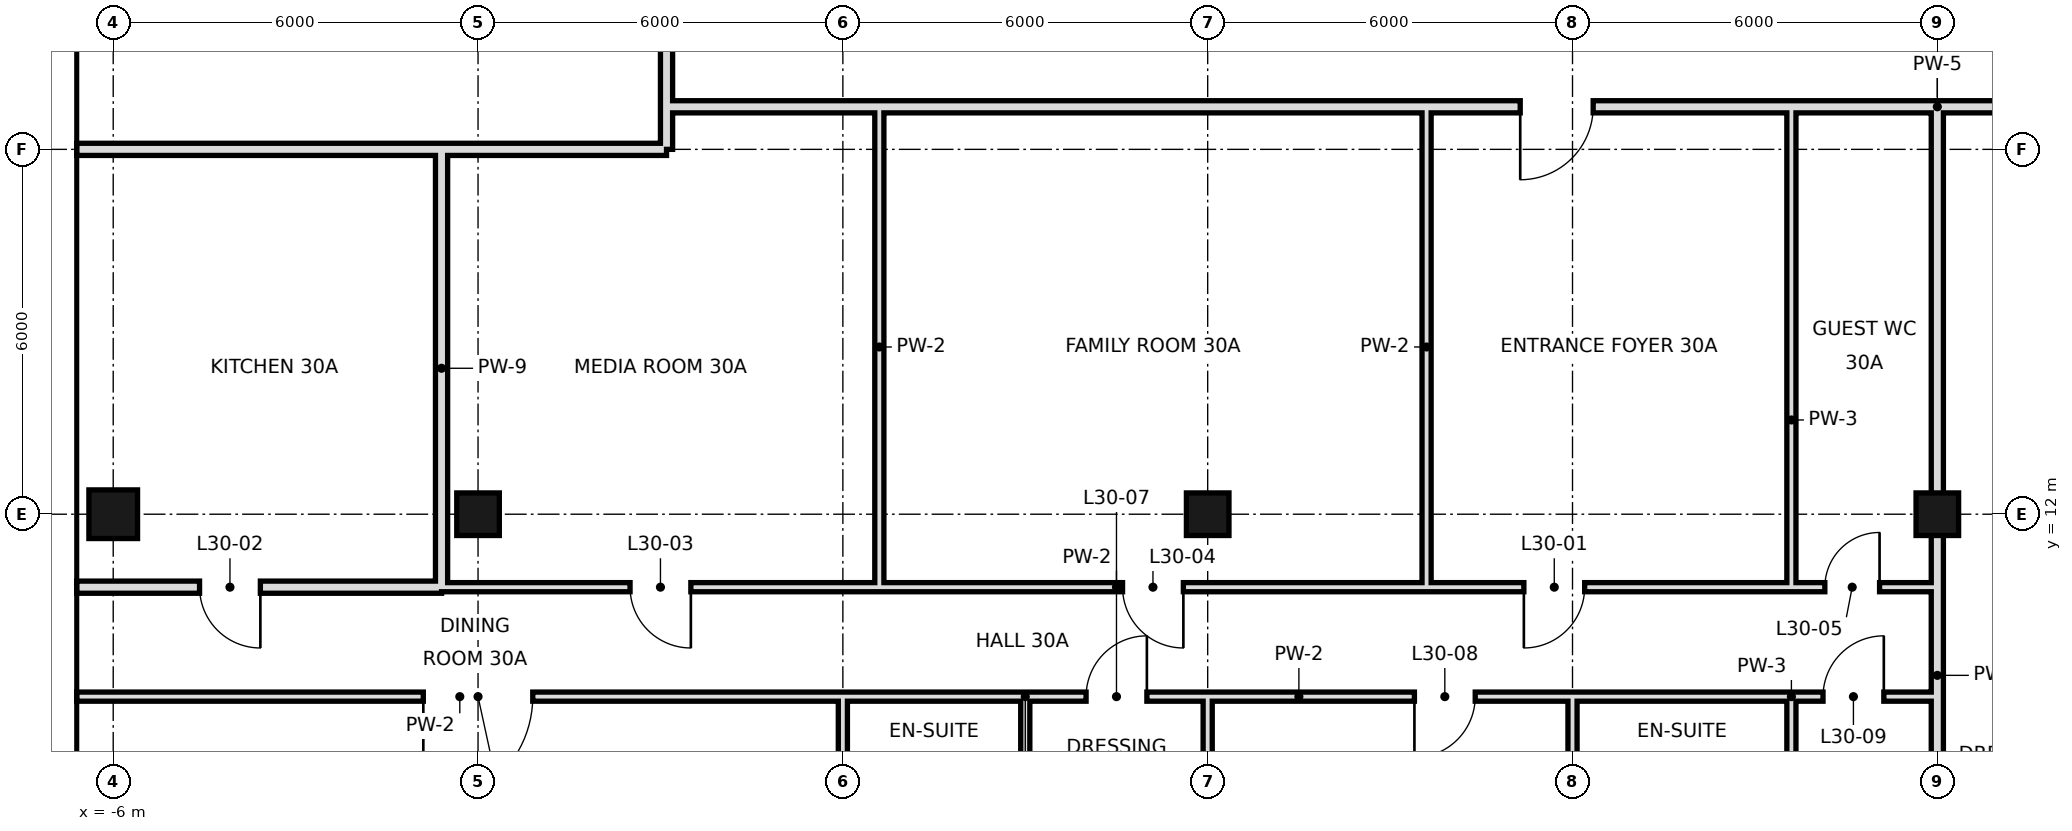
"""IFC4 building model, lengths in metres.
Left out: names, types, materials, properties, quantities, classifications, styles, units other than length and angle.
Written with IfcOpenShell. Run it as: python <this file> out.ifc"""

import sys

from ifc_helpers import new_model, si_unit, direction, frame, frame_2d, origin, origin_2d, place, context, subcontext, project, spatial, rectangle, hollow_rectangle, extrude, element, fill, save


model = new_model("IFC4")
c1 = context("Model", 3, precision=1e-05, world=origin(), true_north=direction((0.0, 1.0)))
c2 = subcontext(c1, "Body", "Model", "MODEL_VIEW")
j1 = project(units=[si_unit("LENGTHUNIT", "METRE"), si_unit("PLANEANGLEUNIT", "RADIAN")], contexts=[c1])
p1 = place(None, origin())
s1 = spatial("IfcSite", under=j1, at=p1, CompositionType="ELEMENT")
p2 = place(p1, origin())
s2 = spatial("IfcBuilding", under=s1, at=p2, CompositionType="ELEMENT")
p3 = place(p2, frame((0.0, 0.0, 134.0)))
s3 = spatial("IfcBuildingStorey", under=s2, at=p3, CompositionType="ELEMENT", Elevation=134.0)
p4 = place(p3, frame((-6.0, 12.0, 0.0), z_axis=(0.0, 0.0, 1.0), x_axis=(1.0, 0.0, 0.0)))
e1 = element("IfcColumn", 1, at=p4, inside=s3, PredefinedType="COLUMN", context=c2, shape_type="SweptSolid", body=[
    extrude(hollow_rectangle(XDim=0.8, YDim=0.8, WallThickness=0.04, at=origin_2d()), origin(), (0.0, 0.0, 1.0), 4.4),
])
for number, where, z_axis, x_axis in (
    (2, (0.0, 12.0, 0.0), (0.0, 0.0, 1.0), (1.0, 0.0, 0.0)),
    (3, (12.0, 12.0, 0.0), (0.0, 0.0, 1.0), (1.0, 0.0, 0.0)),
    (4, (24.0, 12.0, 0.0), (0.0, 0.0, 1.0), (1.0, 0.0, 0.0)),
):
    element("IfcColumn", number, at=place(p3, frame(where, z_axis=z_axis, x_axis=x_axis)), inside=s3, PredefinedType="COLUMN", context=c2, shape_type="SweptSolid", body=[
        extrude(hollow_rectangle(XDim=0.7, YDim=0.7, WallThickness=0.036, at=origin_2d()), origin(), (0.0, 0.0, 1.0), 4.4),
    ])
p5 = place(p3, frame((-0.6, 10.8, 0.0), z_axis=(0.0, 0.0, 1.0), x_axis=(0.0, 1.0, 0.0)))
e5 = element("IfcWall", 5, at=p5, inside=s3, PredefinedType="SOLIDWALL", context=c2, shape_type="SweptSolid", body=[
    extrude(rectangle(XDim=7.2, YDim=0.2, at=frame_2d((3.6, 0.0))), origin(), (0.0, 0.0, 1.0), 3.65),
])
p6 = place(p3, frame((12.0, 0.0, 0.0), z_axis=(0.0, 0.0, 1.0), x_axis=(0.0, 1.0, 0.0)))
e6 = element("IfcWall", 6, at=p6, inside=s3, PredefinedType="PARTITIONING", context=c2, shape_type="SweptSolid", body=[
    extrude(rectangle(XDim=9.0, YDim=0.15, at=frame_2d((4.5, 0.0))), origin(), (0.0, 0.0, 1.0), 3.4),
])
p7 = place(p3, frame((15.6, 10.8, 0.0), z_axis=(0.0, 0.0, 1.0), x_axis=(0.0, 1.0, 0.0)))
e7 = element("IfcWall", 7, at=p7, inside=s3, PredefinedType="PARTITIONING", context=c2, shape_type="SweptSolid", body=[
    extrude(rectangle(XDim=7.9, YDim=0.15, at=frame_2d((3.95, 0.0))), origin(), (0.0, 0.0, 1.0), 4.1),
])
p8 = place(p3, frame((18.0, 6.0, 0.0), z_axis=(0.0, 0.0, 1.0), x_axis=(0.0, 1.0, 0.0)))
e8 = element("IfcWall", 8, at=p8, inside=s3, PredefinedType="PARTITIONING", context=c2, shape_type="SweptSolid", body=[
    extrude(rectangle(XDim=3.0, YDim=0.15, at=frame_2d((1.5, 0.0))), origin(), (0.0, 0.0, 1.0), 3.4),
])
p9 = place(p3, frame((21.6, 6.0, 0.0), z_axis=(0.0, 0.0, 1.0), x_axis=(0.0, 1.0, 0.0)))
e9 = element("IfcWall", 9, at=p9, inside=s3, PredefinedType="PARTITIONING", context=c2, shape_type="SweptSolid", body=[
    extrude(rectangle(XDim=3.0, YDim=0.15, at=frame_2d((1.5, 0.0))), origin(), (0.0, 0.0, 1.0), 4.1),
])
p10 = place(p3, frame((21.6, 10.8, 0.0), z_axis=(0.0, 0.0, 1.0), x_axis=(0.0, 1.0, 0.0)))
e10 = element("IfcWall", 10, at=p10, inside=s3, PredefinedType="PARTITIONING", context=c2, shape_type="SweptSolid", body=[
    extrude(rectangle(XDim=7.9, YDim=0.15, at=frame_2d((3.95, 0.0))), origin(), (0.0, 0.0, 1.0), 4.1),
])
p11 = place(p3, frame((24.0, 0.0, 0.0), z_axis=(0.0, 0.0, 1.0), x_axis=(0.0, 1.0, 0.0)))
e11 = element("IfcWall", 11, at=p11, inside=s3, PredefinedType="SOLIDWALL", context=c2, shape_type="SweptSolid", body=[
    extrude(rectangle(XDim=18.7, YDim=0.2, at=frame_2d((9.35, 0.0))), origin(), (0.0, 0.0, 1.0), 3.4),
])
p12 = place(p3, frame((3.1, 18.0, 0.0), z_axis=(0.0, 0.0, 1.0), x_axis=(0.0, 1.0, 0.0)))
e12 = element("IfcWall", 12, at=p12, inside=s3, PredefinedType="SOLIDWALL", context=c2, shape_type="SweptSolid", body=[
    extrude(rectangle(XDim=30.6, YDim=0.2, at=frame_2d((15.3, 0.0))), origin(), (0.0, 0.0, 1.0), 3.4),
])
p13 = place(p12, frame((14.75, 0.0, 0.0)))
e13 = element("IfcOpeningElement", 13, at=p13, cuts=e12, PredefinedType="OPENING", context=c2, shape_type="SweptSolid", body=[
    extrude(rectangle(XDim=1.2, YDim=2.4, at=frame_2d((0.6, 1.2))), frame((0.0, 0.11, 0.0), z_axis=(0.0, -1.0, 0.0), x_axis=(1.0, 0.0, 0.0)), (0.0, 0.0, 1.0), 0.22),
])
p14 = place(p3, frame((6.0, 6.0, 0.0), z_axis=(0.0, 0.0, 1.0), x_axis=(0.0, 1.0, 0.0)))
e14 = element("IfcWall", 14, at=p14, inside=s3, PredefinedType="PARTITIONING", context=c2, shape_type="SweptSolid", body=[
    extrude(rectangle(XDim=3.0, YDim=0.15, at=frame_2d((1.5, 0.0))), origin(), (0.0, 0.0, 1.0), 3.4),
])
p15 = place(p3, frame((6.6, 10.8, 0.0), z_axis=(0.0, 0.0, 1.0), x_axis=(0.0, 1.0, 0.0)))
e15 = element("IfcWall", 15, at=p15, inside=s3, PredefinedType="PARTITIONING", context=c2, shape_type="SweptSolid", body=[
    extrude(rectangle(XDim=7.9, YDim=0.15, at=frame_2d((3.95, 0.0))), origin(), (0.0, 0.0, 1.0), 4.1),
])
p16 = place(p3, frame((9.0, 6.0, 0.0), z_axis=(0.0, 0.0, 1.0), x_axis=(0.0, 1.0, 0.0)))
e16 = element("IfcWall", 16, at=p16, inside=s3, PredefinedType="PARTITIONING", context=c2, shape_type="SweptSolid", body=[
    extrude(rectangle(XDim=3.0, YDim=0.15, at=frame_2d((1.5, 0.0))), origin(), (0.0, 0.0, 1.0), 4.1),
])
p17 = place(p3, frame((-6.6, 10.8, 0.0), z_axis=(0.0, 0.0, 1.0), x_axis=(1.0, 0.0, 0.0)))
e17 = element("IfcWall", 17, at=p17, inside=s3, PredefinedType="SOLIDWALL", context=c2, shape_type="SweptSolid", body=[
    extrude(rectangle(XDim=6.0, YDim=0.2, at=frame_2d((3.0, 0.0))), origin(), (0.0, 0.0, 1.0), 3.65),
])
p18 = place(p17, frame((2.02, 0.0, 0.0)))
e18 = element("IfcOpeningElement", 18, at=p18, cuts=e17, PredefinedType="OPENING", context=c2, shape_type="SweptSolid", body=[
    extrude(rectangle(XDim=1.0, YDim=2.4, at=frame_2d((0.5, 1.2))), frame((0.0, 0.11, 0.0), z_axis=(0.0, -1.0, 0.0), x_axis=(1.0, 0.0, 0.0)), (0.0, 0.0, 1.0), 0.22),
])
p19 = place(p3, frame((-0.6, 10.8, 0.0), z_axis=(0.0, 0.0, 1.0), x_axis=(1.0, 0.0, 0.0)))
e19 = element("IfcWall", 19, at=p19, inside=s3, PredefinedType="PARTITIONING", context=c2, shape_type="SweptSolid", body=[
    extrude(rectangle(XDim=22.2, YDim=0.15, at=frame_2d((11.1, 0.0))), origin(), (0.0, 0.0, 1.0), 4.1),
])
p20 = place(p19, frame((17.8, 0.0, 0.0)))
e20 = element("IfcOpeningElement", 20, at=p20, cuts=e19, PredefinedType="OPENING", context=c2, shape_type="SweptSolid", body=[
    extrude(rectangle(XDim=1.0, YDim=2.4, at=frame_2d((0.5, 1.2))), frame((0.0, 0.085, 0.0), z_axis=(0.0, -1.0, 0.0), x_axis=(1.0, 0.0, 0.0)), (0.0, 0.0, 1.0), 0.17),
])
p21 = place(p19, frame((3.1, 0.0, 0.0)))
e21 = element("IfcOpeningElement", 21, at=p21, cuts=e19, PredefinedType="OPENING", context=c2, shape_type="SweptSolid", body=[
    extrude(rectangle(XDim=1.0, YDim=2.4, at=frame_2d((0.5, 1.2))), frame((0.0, 0.085, 0.0), z_axis=(0.0, -1.0, 0.0), x_axis=(1.0, 0.0, 0.0)), (0.0, 0.0, 1.0), 0.17),
])
p22 = place(p19, frame((11.2, 0.0, 0.0)))
e22 = element("IfcOpeningElement", 22, at=p22, cuts=e19, PredefinedType="OPENING", context=c2, shape_type="SweptSolid", body=[
    extrude(rectangle(XDim=1.0, YDim=2.4, at=frame_2d((0.5, 1.2))), frame((0.0, 0.085, 0.0), z_axis=(0.0, -1.0, 0.0), x_axis=(1.0, 0.0, 0.0)), (0.0, 0.0, 1.0), 0.17),
])
p23 = place(p3, frame((21.6, 10.8, 0.0), z_axis=(0.0, 0.0, 1.0), x_axis=(1.0, 0.0, 0.0)))
e23 = element("IfcWall", 23, at=p23, inside=s3, PredefinedType="PARTITIONING", context=c2, shape_type="SweptSolid", body=[
    extrude(rectangle(XDim=2.4, YDim=0.15, at=frame_2d((1.2, 0.0))), origin(), (0.0, 0.0, 1.0), 4.1),
])
p24 = place(p23, frame((0.55, 0.0, 0.0)))
e24 = element("IfcOpeningElement", 24, at=p24, cuts=e23, PredefinedType="OPENING", context=c2, shape_type="SweptSolid", body=[
    extrude(rectangle(XDim=0.9, YDim=2.4, at=frame_2d((0.45, 1.2))), frame((0.0, 0.085, 0.0), z_axis=(0.0, -1.0, 0.0), x_axis=(1.0, 0.0, 0.0)), (0.0, 0.0, 1.0), 0.17),
])
p25 = place(p3, frame((-0.6, 18.0, 0.0), z_axis=(0.0, 0.0, 1.0), x_axis=(1.0, 0.0, 0.0)))
e25 = element("IfcWall", 25, at=p25, inside=s3, PredefinedType="SOLIDWALL", context=c2, shape_type="SweptSolid", body=[
    extrude(rectangle(XDim=3.7, YDim=0.2, at=frame_2d((1.85, 0.0))), origin(), (0.0, 0.0, 1.0), 3.4),
])
p26 = place(p3, frame((-6.6, 18.0, 0.0), z_axis=(0.0, 0.0, 1.0), x_axis=(1.0, 0.0, 0.0)))
e26 = element("IfcWall", 26, at=p26, inside=s3, PredefinedType="SOLIDWALL", context=c2, shape_type="SweptSolid", body=[
    extrude(rectangle(XDim=6.0, YDim=0.2, at=frame_2d((3.0, 0.0))), origin(), (0.0, 0.0, 1.0), 3.4),
])
p27 = place(p3, frame((3.1, 18.7, 0.0), z_axis=(0.0, 0.0, 1.0), x_axis=(1.0, 0.0, 0.0)))
e27 = element("IfcWall", 27, at=p27, inside=s3, PredefinedType="SOLIDWALL", context=c2, shape_type="SweptSolid", body=[
    extrude(rectangle(XDim=41.8, YDim=0.2, at=frame_2d((20.9, 0.0))), origin(), (0.0, 0.0, 1.0), 3.4),
])
p28 = place(p27, frame((14.04, 0.0, 0.0)))
e28 = element("IfcOpeningElement", 28, at=p28, cuts=e27, PredefinedType="OPENING", context=c2, shape_type="SweptSolid", body=[
    extrude(rectangle(XDim=1.2, YDim=2.4, at=frame_2d((0.6, 1.2))), frame((0.0, 0.11, 0.0), z_axis=(0.0, -1.0, 0.0), x_axis=(1.0, 0.0, 0.0)), (0.0, 0.0, 1.0), 0.22),
])
p29 = place(p27, frame((26.73, 0.0, 0.0)))
e29 = element("IfcOpeningElement", 29, at=p29, cuts=e27, PredefinedType="OPENING", context=c2, shape_type="SweptSolid", body=[
    extrude(rectangle(XDim=1.8, YDim=2.4, at=frame_2d((0.9, 1.2))), frame((0.0, 0.11, 0.0), z_axis=(0.0, -1.0, 0.0), x_axis=(1.0, 0.0, 0.0)), (0.0, 0.0, 1.0), 0.22),
])
p30 = place(p3, frame((-6.6, 9.0, 0.0), z_axis=(0.0, 0.0, 1.0), x_axis=(1.0, 0.0, 0.0)))
e30 = element("IfcWall", 30, at=p30, inside=s3, PredefinedType="PARTITIONING", context=c2, shape_type="SweptSolid", body=[
    extrude(rectangle(XDim=12.6, YDim=0.15, at=frame_2d((6.3, 0.0))), origin(), (0.0, 0.0, 1.0), 4.1),
])
p31 = place(p30, frame((5.7, 0.0, 0.0)))
e31 = element("IfcOpeningElement", 31, at=p31, cuts=e30, PredefinedType="OPENING", context=c2, shape_type="SweptSolid", body=[
    extrude(rectangle(XDim=1.8, YDim=2.4, at=frame_2d((0.9, 1.2))), frame((0.0, 0.085, 0.0), z_axis=(0.0, -1.0, 0.0), x_axis=(1.0, 0.0, 0.0)), (0.0, 0.0, 1.0), 0.17),
])
p32 = place(p3, frame((9.0, 9.0, 0.0), z_axis=(0.0, 0.0, 1.0), x_axis=(1.0, 0.0, 0.0)))
e32 = element("IfcWall", 32, at=p32, inside=s3, PredefinedType="PARTITIONING", context=c2, shape_type="SweptSolid", body=[
    extrude(rectangle(XDim=9.0, YDim=0.15, at=frame_2d((4.5, 0.0))), origin(), (0.0, 0.0, 1.0), 4.1),
])
p33 = place(p32, frame((1.0, 0.0, 0.0)))
e33 = element("IfcOpeningElement", 33, at=p33, cuts=e32, PredefinedType="OPENING", context=c2, shape_type="SweptSolid", body=[
    extrude(rectangle(XDim=1.0, YDim=2.4, at=frame_2d((0.5, 1.2))), frame((0.0, 0.085, 0.0), z_axis=(0.0, -1.0, 0.0), x_axis=(1.0, 0.0, 0.0)), (0.0, 0.0, 1.0), 0.17),
])
p34 = place(p32, frame((6.4, 0.0, 0.0)))
e34 = element("IfcOpeningElement", 34, at=p34, cuts=e32, PredefinedType="OPENING", context=c2, shape_type="SweptSolid", body=[
    extrude(rectangle(XDim=1.0, YDim=2.4, at=frame_2d((0.5, 1.2))), frame((0.0, 0.085, 0.0), z_axis=(0.0, -1.0, 0.0), x_axis=(1.0, 0.0, 0.0)), (0.0, 0.0, 1.0), 0.17),
])
p35 = place(p3, frame((21.6, 9.0, 0.0), z_axis=(0.0, 0.0, 1.0), x_axis=(1.0, 0.0, 0.0)))
e35 = element("IfcWall", 35, at=p35, inside=s3, PredefinedType="PARTITIONING", context=c2, shape_type="SweptSolid", body=[
    extrude(rectangle(XDim=2.4, YDim=0.15, at=frame_2d((1.2, 0.0))), origin(), (0.0, 0.0, 1.0), 4.1),
])
p36 = place(p35, frame((0.52, 0.0, 0.0)))
e36 = element("IfcOpeningElement", 36, at=p36, cuts=e35, PredefinedType="OPENING", context=c2, shape_type="SweptSolid", body=[
    extrude(rectangle(XDim=1.0, YDim=2.4, at=frame_2d((0.5, 1.2))), frame((0.0, 0.085, 0.0), z_axis=(0.0, -1.0, 0.0), x_axis=(1.0, 0.0, 0.0)), (0.0, 0.0, 1.0), 0.17),
])
p37 = place(p3, frame((6.0, 9.0, 0.0), z_axis=(0.0, 0.0, 1.0), x_axis=(1.0, 0.0, 0.0)))
e37 = element("IfcWall", 37, at=p37, inside=s3, PredefinedType="PARTITIONING", context=c2, shape_type="SweptSolid", body=[
    extrude(rectangle(XDim=3.0, YDim=0.15, at=frame_2d((1.5, 0.0))), origin(), (0.0, 0.0, 1.0), 4.1),
])
p38 = place(p3, frame((18.0, 9.0, 0.0), z_axis=(0.0, 0.0, 1.0), x_axis=(1.0, 0.0, 0.0)))
e38 = element("IfcWall", 38, at=p38, inside=s3, PredefinedType="PARTITIONING", context=c2, shape_type="SweptSolid", body=[
    extrude(rectangle(XDim=3.6, YDim=0.15, at=frame_2d((1.8, 0.0))), origin(), (0.0, 0.0, 1.0), 4.1),
])
p39 = place(p20, frame((1.0, 0.0, 0.0), z_axis=(0.0, 0.0, 1.0), x_axis=(-1.0, 0.0, 0.0)))
e39 = element("IfcDoor", 39, at=p39, inside=s3, OperationType="SINGLE_SWING_RIGHT", PredefinedType="DOOR", context=c2, shape_type="SweptSolid", body=[
    extrude(rectangle(XDim=1.0, YDim=2.4, at=frame_2d((0.5, 1.2))), frame((0.0, 0.025, 0.0), z_axis=(0.0, -1.0, 0.0), x_axis=(1.0, 0.0, 0.0)), (0.0, 0.0, 1.0), 0.05),
])
fill(e20, e39)
p40 = place(p18, origin())
e40 = element("IfcDoor", 40, at=p40, inside=s3, OperationType="SINGLE_SWING_RIGHT", PredefinedType="DOOR", context=c2, shape_type="SweptSolid", body=[
    extrude(rectangle(XDim=1.0, YDim=2.4, at=frame_2d((0.5, 1.2))), frame((0.0, 0.025, 0.0), z_axis=(0.0, -1.0, 0.0), x_axis=(1.0, 0.0, 0.0)), (0.0, 0.0, 1.0), 0.05),
])
fill(e18, e40)
p41 = place(p21, origin())
e41 = element("IfcDoor", 41, at=p41, inside=s3, OperationType="SINGLE_SWING_RIGHT", PredefinedType="DOOR", context=c2, shape_type="SweptSolid", body=[
    extrude(rectangle(XDim=1.0, YDim=2.4, at=frame_2d((0.5, 1.2))), frame((0.0, 0.025, 0.0), z_axis=(0.0, -1.0, 0.0), x_axis=(1.0, 0.0, 0.0)), (0.0, 0.0, 1.0), 0.05),
])
fill(e21, e41)
p42 = place(p22, origin())
e42 = element("IfcDoor", 42, at=p42, inside=s3, OperationType="SINGLE_SWING_RIGHT", PredefinedType="DOOR", context=c2, shape_type="SweptSolid", body=[
    extrude(rectangle(XDim=1.0, YDim=2.4, at=frame_2d((0.5, 1.2))), frame((0.0, 0.025, 0.0), z_axis=(0.0, -1.0, 0.0), x_axis=(1.0, 0.0, 0.0)), (0.0, 0.0, 1.0), 0.05),
])
fill(e22, e42)
p43 = place(p24, frame((0.9, 0.0, 0.0), z_axis=(0.0, 0.0, 1.0), x_axis=(-1.0, 0.0, 0.0)))
e43 = element("IfcDoor", 43, at=p43, inside=s3, OperationType="SINGLE_SWING_LEFT", PredefinedType="DOOR", context=c2, shape_type="SweptSolid", body=[
    extrude(rectangle(XDim=0.9, YDim=2.4, at=frame_2d((0.45, 1.2))), frame((0.0, 0.025, 0.0), z_axis=(0.0, -1.0, 0.0), x_axis=(1.0, 0.0, 0.0)), (0.0, 0.0, 1.0), 0.05),
])
fill(e24, e43)
p44 = place(p31, frame((1.8, 0.0, 0.0), z_axis=(0.0, 0.0, 1.0), x_axis=(-1.0, 0.0, 0.0)))
e44 = element("IfcDoor", 44, at=p44, inside=s3, OperationType="SINGLE_SWING_RIGHT", PredefinedType="DOOR", context=c2, shape_type="SweptSolid", body=[
    extrude(rectangle(XDim=1.8, YDim=2.4, at=frame_2d((0.9, 1.2))), frame((0.0, 0.025, 0.0), z_axis=(0.0, -1.0, 0.0), x_axis=(1.0, 0.0, 0.0)), (0.0, 0.0, 1.0), 0.05),
])
fill(e31, e44)
p45 = place(p33, frame((1.0, 0.0, 0.0), z_axis=(0.0, 0.0, 1.0), x_axis=(-1.0, 0.0, 0.0)))
e45 = element("IfcDoor", 45, at=p45, inside=s3, OperationType="SINGLE_SWING_LEFT", PredefinedType="DOOR", context=c2, shape_type="SweptSolid", body=[
    extrude(rectangle(XDim=1.0, YDim=2.4, at=frame_2d((0.5, 1.2))), frame((0.0, 0.025, 0.0), z_axis=(0.0, -1.0, 0.0), x_axis=(1.0, 0.0, 0.0)), (0.0, 0.0, 1.0), 0.05),
])
fill(e33, e45)
p46 = place(p34, frame((1.0, 0.0, 0.0), z_axis=(0.0, 0.0, 1.0), x_axis=(-1.0, 0.0, 0.0)))
e46 = element("IfcDoor", 46, at=p46, inside=s3, OperationType="SINGLE_SWING_RIGHT", PredefinedType="DOOR", context=c2, shape_type="SweptSolid", body=[
    extrude(rectangle(XDim=1.0, YDim=2.4, at=frame_2d((0.5, 1.2))), frame((0.0, 0.025, 0.0), z_axis=(0.0, -1.0, 0.0), x_axis=(1.0, 0.0, 0.0)), (0.0, 0.0, 1.0), 0.05),
])
fill(e34, e46)
p47 = place(p36, frame((1.0, 0.0, 0.0), z_axis=(0.0, 0.0, 1.0), x_axis=(-1.0, 0.0, 0.0)))
e47 = element("IfcDoor", 47, at=p47, inside=s3, OperationType="SINGLE_SWING_LEFT", PredefinedType="DOOR", context=c2, shape_type="SweptSolid", body=[
    extrude(rectangle(XDim=1.0, YDim=2.4, at=frame_2d((0.5, 1.2))), frame((0.0, 0.025, 0.0), z_axis=(0.0, -1.0, 0.0), x_axis=(1.0, 0.0, 0.0)), (0.0, 0.0, 1.0), 0.05),
])
fill(e36, e47)
p48 = place(p28, frame((1.2, 0.0, 0.0), z_axis=(0.0, 0.0, 1.0), x_axis=(-1.0, 0.0, 0.0)))
e48 = element("IfcDoor", 48, at=p48, inside=s3, OperationType="SINGLE_SWING_RIGHT", PredefinedType="DOOR", context=c2, shape_type="SweptSolid", body=[
    extrude(rectangle(XDim=1.2, YDim=2.4, at=frame_2d((0.6, 1.2))), frame((0.0, 0.025, 0.0), z_axis=(0.0, -1.0, 0.0), x_axis=(1.0, 0.0, 0.0)), (0.0, 0.0, 1.0), 0.05),
])
fill(e28, e48)
save(model, sys.argv[1])
